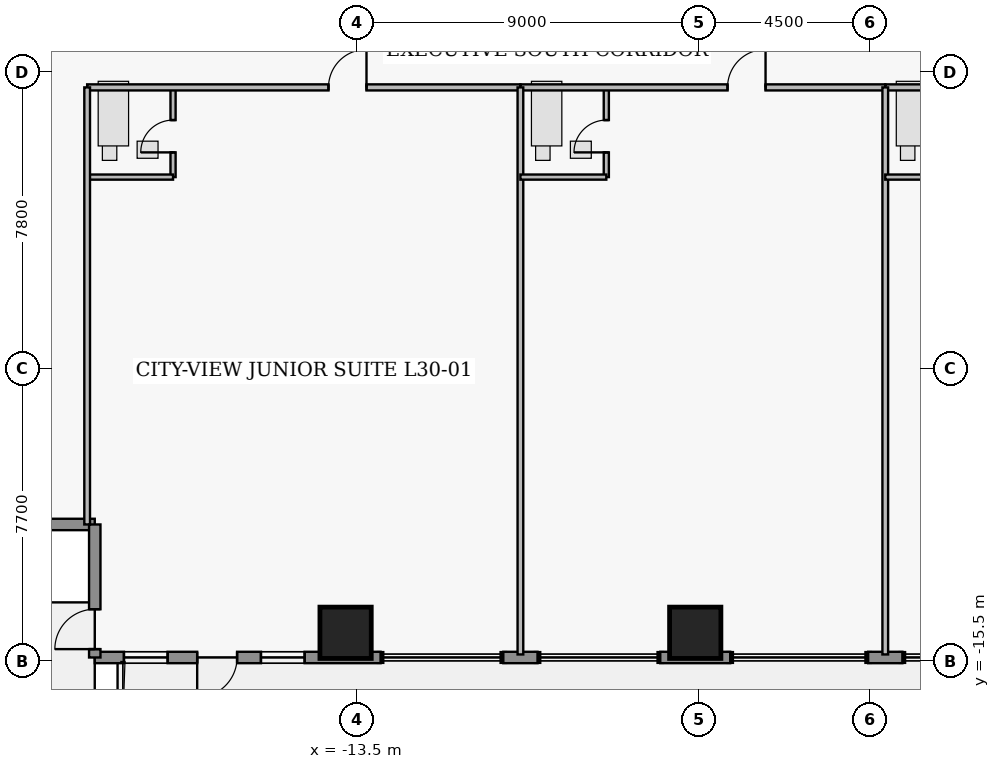
"""IFC4 building model, lengths in metres.
Left out: names, types, materials, properties, quantities, classifications, styles, units other than length and angle.
Written with IfcOpenShell. Run it as: python <this file> out.ifc"""

import sys

from ifc_helpers import new_model, si_unit, direction, frame, frame_2d, origin, origin_2d, place, context, subcontext, project, spatial, rectangle, extrude, element, fill, save


model = new_model("IFC4")
c1 = context("Model", 3, precision=1e-05, world=origin(), true_north=direction((0.0, 1.0)))
c2 = subcontext(c1, "Body", "Model", "MODEL_VIEW")
j1 = project(units=[si_unit("LENGTHUNIT", "METRE"), si_unit("PLANEANGLEUNIT", "RADIAN")], contexts=[c1])
p1 = place(None, origin())
s1 = spatial("IfcSite", under=j1, at=p1, CompositionType="ELEMENT")
p2 = place(p1, origin())
s2 = spatial("IfcBuilding", under=s1, at=p2, CompositionType="ELEMENT")
p3 = place(p2, frame((0.0, 0.0, 121.2)))
s3 = spatial("IfcBuildingStorey", under=s2, at=p3, CompositionType="ELEMENT", Elevation=121.2)
for number, where, z_axis, x_axis in (
    (1, (-13.8, -14.75, 0.0), (0.0, 0.0, 1.0), (1.0, 0.0, 0.0)),
    (2, (-4.6, -14.75, 0.0), (0.0, 0.0, 1.0), (1.0, 0.0, 0.0)),
):
    element("IfcColumn", number, at=place(p3, frame(where, z_axis=z_axis, x_axis=x_axis)), inside=s3, PredefinedType="COLUMN", context=c2, shape_type="SweptSolid", body=[
        extrude(rectangle(XDim=1.35, YDim=1.35, at=origin_2d()), origin(), (0.0, 0.0, 1.0), 3.65),
    ])
p4 = place(p3, frame((-20.4, -11.9, 0.0), z_axis=(0.0, 0.0, 1.0), x_axis=(-1.0, 0.0, 0.0)))
e3 = element("IfcWall", 3, at=p4, inside=s3, PredefinedType="STANDARD", context=c2, shape_type="SweptSolid", body=[
    extrude(rectangle(XDim=3.5, YDim=0.3, at=frame_2d((1.75, 0.0))), origin(), (0.0, 0.0, 1.0), 3.43),
])
p5 = place(p4, frame((1.285, 0.0, 1.25)))
e4 = element("IfcOpeningElement", 4, at=p5, cuts=e3, PredefinedType="OPENING", context=c2, shape_type="SweptSolid", body=[
    extrude(rectangle(XDim=1.15, YDim=1.55, at=frame_2d((0.575, 0.775))), frame((0.0, 0.16, 0.0), z_axis=(0.0, -1.0, 0.0), x_axis=(1.0, 0.0, 0.0)), (0.0, 0.0, 1.0), 0.32),
])
p6 = place(p3, frame((0.85, -15.4, 0.0), z_axis=(0.0, 0.0, 1.0), x_axis=(-1.0, 0.0, 0.0)))
e5 = element("IfcWall", 5, at=p6, inside=s3, PredefinedType="STANDARD", context=c2, shape_type="SweptSolid", body=[
    extrude(rectangle(XDim=0.9, YDim=0.3, at=frame_2d((0.45, 0.0))), origin(), (0.0, 0.0, 1.0), 3.43),
])
p7 = place(p3, frame((-3.68, -15.4, 0.0), z_axis=(0.0, 0.0, 1.0), x_axis=(-1.0, 0.0, 0.0)))
e6 = element("IfcWall", 6, at=p7, inside=s3, PredefinedType="STANDARD", context=c2, shape_type="SweptSolid", body=[
    extrude(rectangle(XDim=1.84, YDim=0.3, at=frame_2d((0.92, 0.0))), origin(), (0.0, 0.0, 1.0), 3.43),
])
p8 = place(p3, frame((-8.75, -15.4, 0.0), z_axis=(0.0, 0.0, 1.0), x_axis=(-1.0, 0.0, 0.0)))
e7 = element("IfcWall", 7, at=p8, inside=s3, PredefinedType="STANDARD", context=c2, shape_type="SweptSolid", body=[
    extrude(rectangle(XDim=0.9, YDim=0.3, at=frame_2d((0.45, 0.0))), origin(), (0.0, 0.0, 1.0), 3.43),
])
p9 = place(p3, frame((-12.88, -15.4, 0.0), z_axis=(0.0, 0.0, 1.0), x_axis=(-1.0, 0.0, 0.0)))
e8 = element("IfcWall", 8, at=p9, inside=s3, PredefinedType="STANDARD", context=c2, shape_type="SweptSolid", body=[
    extrude(rectangle(XDim=7.52, YDim=0.3, at=frame_2d((3.76, 0.0))), origin(), (0.0, 0.0, 1.0), 3.43),
])
p10 = place(p9, frame((3.775, 0.0, 0.0)))
e9 = element("IfcOpeningElement", 9, at=p10, cuts=e8, PredefinedType="OPENING", context=c2, shape_type="SweptSolid", body=[
    extrude(rectangle(XDim=1.05, YDim=2.2, at=frame_2d((0.525, 1.1))), frame((0.0, 0.16, 0.0), z_axis=(0.0, -1.0, 0.0), x_axis=(1.0, 0.0, 0.0)), (0.0, 0.0, 1.0), 0.32),
])
p11 = place(p9, frame((1.998, 0.0, 0.95)))
e10 = element("IfcOpeningElement", 10, at=p11, cuts=e8, PredefinedType="OPENING", context=c2, shape_type="SweptSolid", body=[
    extrude(rectangle(XDim=1.15, YDim=1.55, at=frame_2d((0.575, 0.775))), frame((0.0, 0.16, 0.0), z_axis=(0.0, -1.0, 0.0), x_axis=(1.0, 0.0, 0.0)), (0.0, 0.0, 1.0), 0.32),
])
p12 = place(p9, frame((5.603, 0.0, 0.95)))
e11 = element("IfcOpeningElement", 11, at=p12, cuts=e8, PredefinedType="OPENING", context=c2, shape_type="SweptSolid", body=[
    extrude(rectangle(XDim=1.15, YDim=1.55, at=frame_2d((0.575, 0.775))), frame((0.0, 0.16, 0.0), z_axis=(0.0, -1.0, 0.0), x_axis=(1.0, 0.0, 0.0)), (0.0, 0.0, 1.0), 0.32),
])
p13 = place(p3, frame((-20.4, -15.4, 0.0), z_axis=(0.0, 0.0, 1.0), x_axis=(0.0, 1.0, 0.0)))
e12 = element("IfcWall", 12, at=p13, inside=s3, PredefinedType="STANDARD", context=c2, shape_type="SweptSolid", body=[
    extrude(rectangle(XDim=3.5, YDim=0.3, at=frame_2d((1.75, 0.0))), origin(), (0.0, 0.0, 1.0), 3.43),
])
p14 = place(p13, frame((0.22, 0.0, 0.0)))
e13 = element("IfcOpeningElement", 13, at=p14, cuts=e12, PredefinedType="OPENING", context=c2, shape_type="SweptSolid", body=[
    extrude(rectangle(XDim=1.05, YDim=2.2, at=frame_2d((0.525, 1.1))), frame((0.0, 0.16, 0.0), z_axis=(0.0, -1.0, 0.0), x_axis=(1.0, 0.0, 0.0)), (0.0, 0.0, 1.0), 0.32),
])
p15 = place(p3, frame((-18.34, -2.76, 0.0), z_axis=(0.0, 0.0, 1.0), x_axis=(0.0, 1.0, 0.0)))
e14 = element("IfcWall", 14, at=p15, inside=s3, PredefinedType="PLUMBINGWALL", context=c2, shape_type="SweptSolid", body=[
    extrude(rectangle(XDim=2.36, YDim=0.135, at=frame_2d((1.18, 0.0))), origin(), (0.0, 0.0, 1.0), 3.43),
])
p16 = place(p15, frame((0.65, 0.0, 0.0)))
e15 = element("IfcOpeningElement", 15, at=p16, cuts=e14, PredefinedType="OPENING", context=c2, shape_type="SweptSolid", body=[
    extrude(rectangle(XDim=0.85, YDim=2.1, at=frame_2d((0.425, 1.05))), frame((0.0, 0.077, 0.0), z_axis=(0.0, -1.0, 0.0), x_axis=(1.0, 0.0, 0.0)), (0.0, 0.0, 1.0), 0.155),
])
p17 = place(p3, frame((-20.6, -0.4, 0.0), z_axis=(0.0, 0.0, 1.0), x_axis=(1.0, 0.0, 0.0)))
e16 = element("IfcWall", 16, at=p17, inside=s3, PredefinedType="PARTITIONING", context=c2, shape_type="SweptSolid", body=[
    extrude(rectangle(XDim=11.4, YDim=0.16, at=frame_2d((5.7, 0.0))), origin(), (0.0, 0.0, 1.0), 3.43),
])
p18 = place(p17, frame((6.35, 0.0, 0.0)))
e17 = element("IfcOpeningElement", 17, at=p18, cuts=e16, PredefinedType="OPENING", context=c2, shape_type="SweptSolid", body=[
    extrude(rectangle(XDim=1.0, YDim=2.15, at=frame_2d((0.5, 1.075))), frame((0.0, 0.09, 0.0), z_axis=(0.0, -1.0, 0.0), x_axis=(1.0, 0.0, 0.0)), (0.0, 0.0, 1.0), 0.18),
])
p19 = place(p3, frame((-6.94, -2.76, 0.0), z_axis=(0.0, 0.0, 1.0), x_axis=(0.0, 1.0, 0.0)))
e18 = element("IfcWall", 18, at=p19, inside=s3, PredefinedType="PLUMBINGWALL", context=c2, shape_type="SweptSolid", body=[
    extrude(rectangle(XDim=2.36, YDim=0.135, at=frame_2d((1.18, 0.0))), origin(), (0.0, 0.0, 1.0), 3.43),
])
p20 = place(p19, frame((0.65, 0.0, 0.0)))
e19 = element("IfcOpeningElement", 19, at=p20, cuts=e18, PredefinedType="OPENING", context=c2, shape_type="SweptSolid", body=[
    extrude(rectangle(XDim=0.85, YDim=2.1, at=frame_2d((0.425, 1.05))), frame((0.0, 0.077, 0.0), z_axis=(0.0, -1.0, 0.0), x_axis=(1.0, 0.0, 0.0)), (0.0, 0.0, 1.0), 0.155),
])
p21 = place(p3, frame((-9.2, -0.4, 0.0), z_axis=(0.0, 0.0, 1.0), x_axis=(1.0, 0.0, 0.0)))
e20 = element("IfcWall", 20, at=p21, inside=s3, PredefinedType="PARTITIONING", context=c2, shape_type="SweptSolid", body=[
    extrude(rectangle(XDim=9.6, YDim=0.16, at=frame_2d((4.8, 0.0))), origin(), (0.0, 0.0, 1.0), 3.43),
])
p22 = place(p21, frame((5.45, 0.0, 0.0)))
e21 = element("IfcOpeningElement", 21, at=p22, cuts=e20, PredefinedType="OPENING", context=c2, shape_type="SweptSolid", body=[
    extrude(rectangle(XDim=1.0, YDim=2.15, at=frame_2d((0.5, 1.075))), frame((0.0, 0.09, 0.0), z_axis=(0.0, -1.0, 0.0), x_axis=(1.0, 0.0, 0.0)), (0.0, 0.0, 1.0), 0.18),
])
p23 = place(p3, frame((0.4, -0.4, 0.0), z_axis=(0.0, 0.0, 1.0), x_axis=(1.0, 0.0, 0.0)))
e22 = element("IfcWall", 22, at=p23, inside=s3, PredefinedType="PARTITIONING", context=c2, shape_type="SweptSolid", body=[
    extrude(rectangle(XDim=9.4, YDim=0.16, at=frame_2d((4.7, 0.0))), origin(), (0.0, 0.0, 1.0), 3.43),
])
p24 = place(p23, frame((5.35, 0.0, 0.0)))
e23 = element("IfcOpeningElement", 23, at=p24, cuts=e22, PredefinedType="OPENING", context=c2, shape_type="SweptSolid", body=[
    extrude(rectangle(XDim=1.0, YDim=2.15, at=frame_2d((0.5, 1.075))), frame((0.0, 0.09, 0.0), z_axis=(0.0, -1.0, 0.0), x_axis=(1.0, 0.0, 0.0)), (0.0, 0.0, 1.0), 0.18),
])
p25 = place(p3, frame((-20.6, -2.76, 0.0), z_axis=(0.0, 0.0, 1.0), x_axis=(1.0, 0.0, 0.0)))
e24 = element("IfcWall", 24, at=p25, inside=s3, PredefinedType="PLUMBINGWALL", context=c2, shape_type="SweptSolid", body=[
    extrude(rectangle(XDim=2.26, YDim=0.135, at=frame_2d((1.13, 0.0))), origin(), (0.0, 0.0, 1.0), 3.43),
])
p26 = place(p3, frame((-20.6, -11.9, 0.0), z_axis=(0.0, 0.0, 1.0), x_axis=(0.0, 1.0, 0.0)))
e25 = element("IfcWall", 25, at=p26, inside=s3, PredefinedType="PARTITIONING", context=c2, shape_type="SweptSolid", body=[
    extrude(rectangle(XDim=11.5, YDim=0.15, at=frame_2d((5.75, 0.0))), origin(), (0.0, 0.0, 1.0), 3.43),
])
p27 = place(p3, frame((-9.2, -15.32, 0.0), z_axis=(0.0, 0.0, 1.0), x_axis=(0.0, 1.0, 0.0)))
e26 = element("IfcWall", 26, at=p27, inside=s3, PredefinedType="PARTITIONING", context=c2, shape_type="SweptSolid", body=[
    extrude(rectangle(XDim=14.92, YDim=0.15, at=frame_2d((7.46, 0.0))), origin(), (0.0, 0.0, 1.0), 3.43),
])
p28 = place(p3, frame((-9.2, -2.76, 0.0), z_axis=(0.0, 0.0, 1.0), x_axis=(1.0, 0.0, 0.0)))
e27 = element("IfcWall", 27, at=p28, inside=s3, PredefinedType="PLUMBINGWALL", context=c2, shape_type="SweptSolid", body=[
    extrude(rectangle(XDim=2.26, YDim=0.135, at=frame_2d((1.13, 0.0))), origin(), (0.0, 0.0, 1.0), 3.43),
])
p29 = place(p3, frame((0.4, -15.32, 0.0), z_axis=(0.0, 0.0, 1.0), x_axis=(0.0, 1.0, 0.0)))
e28 = element("IfcWall", 28, at=p29, inside=s3, PredefinedType="PARTITIONING", context=c2, shape_type="SweptSolid", body=[
    extrude(rectangle(XDim=14.92, YDim=0.15, at=frame_2d((7.46, 0.0))), origin(), (0.0, 0.0, 1.0), 3.43),
])
p30 = place(p3, frame((0.4, -2.76, 0.0), z_axis=(0.0, 0.0, 1.0), x_axis=(1.0, 0.0, 0.0)))
e29 = element("IfcWall", 29, at=p30, inside=s3, PredefinedType="PLUMBINGWALL", context=c2, shape_type="SweptSolid", body=[
    extrude(rectangle(XDim=2.26, YDim=0.135, at=frame_2d((1.13, 0.0))), origin(), (0.0, 0.0, 1.0), 3.43),
])
p31 = place(p10, origin())
e30 = element("IfcDoor", 30, at=p31, inside=s3, OperationType="SINGLE_SWING_RIGHT", PredefinedType="DOOR", context=c2, shape_type="SweptSolid", body=[
    extrude(rectangle(XDim=1.05, YDim=2.2, at=frame_2d((0.525, 1.1))), frame((0.0, 0.025, 0.0), z_axis=(0.0, -1.0, 0.0), x_axis=(1.0, 0.0, 0.0)), (0.0, 0.0, 1.0), 0.05),
])
fill(e9, e30)
p32 = place(p11, origin())
e31 = element("IfcWindow", 31, at=p32, inside=s3, PartitioningType="SINGLE_PANEL", PredefinedType="WINDOW", context=c2, shape_type="SweptSolid", body=[
    extrude(rectangle(XDim=1.15, YDim=1.55, at=frame_2d((0.575, 0.775))), frame((0.0, 0.03, 0.0), z_axis=(0.0, -1.0, 0.0), x_axis=(1.0, 0.0, 0.0)), (0.0, 0.0, 1.0), 0.06),
])
fill(e10, e31)
p33 = place(p12, origin())
e32 = element("IfcWindow", 32, at=p33, inside=s3, PartitioningType="SINGLE_PANEL", PredefinedType="WINDOW", context=c2, shape_type="SweptSolid", body=[
    extrude(rectangle(XDim=1.15, YDim=1.55, at=frame_2d((0.575, 0.775))), frame((0.0, 0.03, 0.0), z_axis=(0.0, -1.0, 0.0), x_axis=(1.0, 0.0, 0.0)), (0.0, 0.0, 1.0), 0.06),
])
fill(e11, e32)
p34 = place(p14, origin())
e33 = element("IfcDoor", 33, at=p34, inside=s3, OperationType="SINGLE_SWING_LEFT", PredefinedType="DOOR", context=c2, shape_type="SweptSolid", body=[
    extrude(rectangle(XDim=1.05, YDim=2.2, at=frame_2d((0.525, 1.1))), frame((0.0, 0.025, 0.0), z_axis=(0.0, -1.0, 0.0), x_axis=(1.0, 0.0, 0.0)), (0.0, 0.0, 1.0), 0.05),
])
fill(e13, e33)
p35 = place(p16, origin())
e34 = element("IfcDoor", 34, at=p35, inside=s3, OperationType="SINGLE_SWING_LEFT", PredefinedType="DOOR", context=c2, shape_type="SweptSolid", body=[
    extrude(rectangle(XDim=0.85, YDim=2.1, at=frame_2d((0.425, 1.05))), frame((0.0, 0.025, 0.0), z_axis=(0.0, -1.0, 0.0), x_axis=(1.0, 0.0, 0.0)), (0.0, 0.0, 1.0), 0.05),
])
fill(e15, e34)
p36 = place(p18, origin())
e35 = element("IfcDoor", 35, at=p36, inside=s3, OperationType="SINGLE_SWING_RIGHT", PredefinedType="DOOR", context=c2, shape_type="SweptSolid", body=[
    extrude(rectangle(XDim=1.0, YDim=2.15, at=frame_2d((0.5, 1.075))), frame((0.0, 0.025, 0.0), z_axis=(0.0, -1.0, 0.0), x_axis=(1.0, 0.0, 0.0)), (0.0, 0.0, 1.0), 0.05),
])
fill(e17, e35)
p37 = place(p20, origin())
e36 = element("IfcDoor", 36, at=p37, inside=s3, OperationType="SINGLE_SWING_LEFT", PredefinedType="DOOR", context=c2, shape_type="SweptSolid", body=[
    extrude(rectangle(XDim=0.85, YDim=2.1, at=frame_2d((0.425, 1.05))), frame((0.0, 0.025, 0.0), z_axis=(0.0, -1.0, 0.0), x_axis=(1.0, 0.0, 0.0)), (0.0, 0.0, 1.0), 0.05),
])
fill(e19, e36)
p38 = place(p22, origin())
e37 = element("IfcDoor", 37, at=p38, inside=s3, OperationType="SINGLE_SWING_RIGHT", PredefinedType="DOOR", context=c2, shape_type="SweptSolid", body=[
    extrude(rectangle(XDim=1.0, YDim=2.15, at=frame_2d((0.5, 1.075))), frame((0.0, 0.025, 0.0), z_axis=(0.0, -1.0, 0.0), x_axis=(1.0, 0.0, 0.0)), (0.0, 0.0, 1.0), 0.05),
])
fill(e21, e37)
save(model, sys.argv[1])
